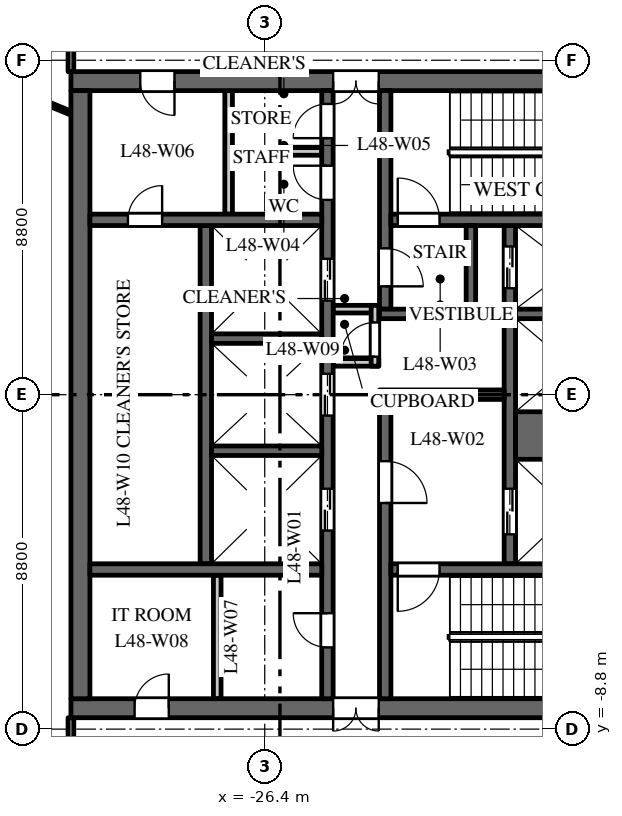
"""IFC4 building model, lengths in metres.
Left out: names, types, materials, properties, quantities, classifications, styles, units other than length and angle.
Written with IfcOpenShell. Run it as: python <this file> out.ifc"""

import sys

from ifc_helpers import new_model, si_unit, direction, frame, frame_2d, origin, place, context, subcontext, project, spatial, rectangle, extrude, element, fill, save


model = new_model("IFC4")
c1 = context("Model", 3, precision=1e-05, world=origin(), true_north=direction((0.0, 1.0)))
c2 = subcontext(c1, "Body", "Model", "MODEL_VIEW")
j1 = project(units=[si_unit("LENGTHUNIT", "METRE"), si_unit("PLANEANGLEUNIT", "RADIAN")], contexts=[c1])
p1 = place(None, origin())
s1 = spatial("IfcSite", under=j1, at=p1, CompositionType="ELEMENT")
p2 = place(p1, origin())
s2 = spatial("IfcBuilding", under=s1, at=p2, CompositionType="ELEMENT")
p3 = place(p2, frame((0.0, 0.0, 233.5)))
s3 = spatial("IfcBuildingStorey", under=s2, at=p3, CompositionType="ELEMENT", Elevation=233.5)
p4 = place(p3, frame((-16.5, 8.25, 0.0), z_axis=(0.0, 0.0, 1.0), x_axis=(-1.0, 0.0, 0.0)))
e1 = element("IfcWall", 1, at=p4, inside=s3, PredefinedType="SHEAR", context=c2, shape_type="SweptSolid", body=[
    extrude(rectangle(XDim=15.0, YDim=0.5, at=frame_2d((7.5, 0.0))), origin(), (0.0, 0.0, 1.0), 3.7),
])
p5 = place(p4, frame((6.9, 0.0, 0.0)))
e2 = element("IfcOpeningElement", 2, at=p5, cuts=e1, PredefinedType="OPENING", context=c2, shape_type="SweptSolid", body=[
    extrude(rectangle(XDim=1.2, YDim=2.1, at=frame_2d((0.6, 1.05))), frame((0.0, 0.26, 0.0), z_axis=(0.0, -1.0, 0.0), x_axis=(1.0, 0.0, 0.0)), (0.0, 0.0, 1.0), 0.52),
])
p6 = place(p4, frame((12.275, 0.0, 0.0)))
e3 = element("IfcOpeningElement", 3, at=p6, cuts=e1, PredefinedType="OPENING", context=c2, shape_type="SweptSolid", body=[
    extrude(rectangle(XDim=0.9, YDim=2.1, at=frame_2d((0.45, 1.05))), frame((0.0, 0.26, 0.0), z_axis=(0.0, -1.0, 0.0), x_axis=(1.0, 0.0, 0.0)), (0.0, 0.0, 1.0), 0.52),
])
p7 = place(p3, frame((-16.5, -8.25, 0.0), z_axis=(0.0, 0.0, 1.0), x_axis=(-1.0, 0.0, 0.0)))
e4 = element("IfcWall", 4, at=p7, inside=s3, PredefinedType="SHEAR", context=c2, shape_type="SweptSolid", body=[
    extrude(rectangle(XDim=15.0, YDim=0.5, at=frame_2d((7.5, 0.0))), origin(), (0.0, 0.0, 1.0), 3.7),
])
p8 = place(p7, frame((6.9, 0.0, 0.0)))
e5 = element("IfcOpeningElement", 5, at=p8, cuts=e4, PredefinedType="OPENING", context=c2, shape_type="SweptSolid", body=[
    extrude(rectangle(XDim=1.2, YDim=2.1, at=frame_2d((0.6, 1.05))), frame((0.0, 0.26, 0.0), z_axis=(0.0, -1.0, 0.0), x_axis=(1.0, 0.0, 0.0)), (0.0, 0.0, 1.0), 0.52),
])
p9 = place(p7, frame((12.425, 0.0, 0.0)))
e6 = element("IfcOpeningElement", 6, at=p9, cuts=e4, PredefinedType="OPENING", context=c2, shape_type="SweptSolid", body=[
    extrude(rectangle(XDim=0.9, YDim=2.1, at=frame_2d((0.45, 1.05))), frame((0.0, 0.26, 0.0), z_axis=(0.0, -1.0, 0.0), x_axis=(1.0, 0.0, 0.0)), (0.0, 0.0, 1.0), 0.52),
])
p10 = place(p3, frame((-27.95, -4.45, 0.0), z_axis=(0.0, 0.0, 1.0), x_axis=(0.0, 1.0, 0.0)))
e7 = element("IfcWall", 7, at=p10, inside=s3, PredefinedType="SHEAR", context=c2, shape_type="SweptSolid", body=[
    extrude(rectangle(XDim=8.9, YDim=0.3, at=frame_2d((4.45, 0.0))), origin(), (0.0, 0.0, 1.0), 3.7),
])
p11 = place(p3, frame((-19.95, -4.45, 0.0), z_axis=(0.0, 0.0, 1.0), x_axis=(0.0, 1.0, 0.0)))
e8 = element("IfcWall", 8, at=p11, inside=s3, PredefinedType="SHEAR", context=c2, shape_type="SweptSolid", body=[
    extrude(rectangle(XDim=8.9, YDim=0.3, at=frame_2d((4.45, 0.0))), origin(), (0.0, 0.0, 1.0), 3.7),
])
p12 = place(p11, frame((0.775, 0.0, 0.0)))
e9 = element("IfcOpeningElement", 9, at=p12, cuts=e8, PredefinedType="OPENING", context=c2, shape_type="SweptSolid", body=[
    extrude(rectangle(XDim=1.2, YDim=2.1, at=frame_2d((0.6, 1.05))), frame((0.0, 0.16, 0.0), z_axis=(0.0, -1.0, 0.0), x_axis=(1.0, 0.0, 0.0)), (0.0, 0.0, 1.0), 0.32),
])
p13 = place(p11, frame((7.25, 0.0, 0.0)))
e10 = element("IfcOpeningElement", 10, at=p13, cuts=e8, PredefinedType="OPENING", context=c2, shape_type="SweptSolid", body=[
    extrude(rectangle(XDim=1.1, YDim=2.1, at=frame_2d((0.55, 1.05))), frame((0.0, 0.16, 0.0), z_axis=(0.0, -1.0, 0.0), x_axis=(1.0, 0.0, 0.0)), (0.0, 0.0, 1.0), 0.32),
])
p14 = place(p3, frame((-24.75, -8.0, 0.0), z_axis=(0.0, 0.0, 1.0), x_axis=(0.0, 1.0, 0.0)))
e11 = element("IfcWall", 11, at=p14, inside=s3, PredefinedType="SHEAR", context=c2, shape_type="SweptSolid", body=[
    extrude(rectangle(XDim=16.0, YDim=0.3, at=frame_2d((8.0, 0.0))), origin(), (0.0, 0.0, 1.0), 3.7),
])
p15 = place(p14, frame((4.425, 0.0, 0.0)))
e12 = element("IfcOpeningElement", 12, at=p15, cuts=e11, PredefinedType="OPENING", context=c2, shape_type="SweptSolid", body=[
    extrude(rectangle(XDim=1.1, YDim=2.1, at=frame_2d((0.55, 1.05))), frame((0.0, 0.16, 0.0), z_axis=(0.0, -1.0, 0.0), x_axis=(1.0, 0.0, 0.0)), (0.0, 0.0, 1.0), 0.32),
])
p16 = place(p14, frame((7.45, 0.0, 0.0)))
e13 = element("IfcOpeningElement", 13, at=p16, cuts=e11, PredefinedType="OPENING", context=c2, shape_type="SweptSolid", body=[
    extrude(rectangle(XDim=1.1, YDim=2.1, at=frame_2d((0.55, 1.05))), frame((0.0, 0.16, 0.0), z_axis=(0.0, -1.0, 0.0), x_axis=(1.0, 0.0, 0.0)), (0.0, 0.0, 1.0), 0.32),
])
p17 = place(p14, frame((10.475, 0.0, 0.0)))
e14 = element("IfcOpeningElement", 14, at=p17, cuts=e11, PredefinedType="OPENING", context=c2, shape_type="SweptSolid", body=[
    extrude(rectangle(XDim=1.1, YDim=2.1, at=frame_2d((0.55, 1.05))), frame((0.0, 0.16, 0.0), z_axis=(0.0, -1.0, 0.0), x_axis=(1.0, 0.0, 0.0)), (0.0, 0.0, 1.0), 0.32),
])
p18 = place(p14, frame((13.125, 0.0, 0.0)))
e15 = element("IfcOpeningElement", 15, at=p18, cuts=e11, PredefinedType="OPENING", context=c2, shape_type="SweptSolid", body=[
    extrude(rectangle(XDim=0.9, YDim=2.1, at=frame_2d((0.45, 1.05))), frame((0.0, 0.16, 0.0), z_axis=(0.0, -1.0, 0.0), x_axis=(1.0, 0.0, 0.0)), (0.0, 0.0, 1.0), 0.32),
])
p19 = place(p14, frame((14.75, 0.0, 0.0)))
e16 = element("IfcOpeningElement", 16, at=p19, cuts=e11, PredefinedType="OPENING", context=c2, shape_type="SweptSolid", body=[
    extrude(rectangle(XDim=0.9, YDim=2.1, at=frame_2d((0.45, 1.05))), frame((0.0, 0.16, 0.0), z_axis=(0.0, -1.0, 0.0), x_axis=(1.0, 0.0, 0.0)), (0.0, 0.0, 1.0), 0.32),
])
p20 = place(p14, frame((1.35, 0.0, 0.0)))
e17 = element("IfcOpeningElement", 17, at=p20, cuts=e11, PredefinedType="OPENING", context=c2, shape_type="SweptSolid", body=[
    extrude(rectangle(XDim=0.9, YDim=2.1, at=frame_2d((0.45, 1.05))), frame((0.0, 0.16, 0.0), z_axis=(0.0, -1.0, 0.0), x_axis=(1.0, 0.0, 0.0)), (0.0, 0.0, 1.0), 0.32),
])
p21 = place(p3, frame((-20.1, 0.0, 0.0), z_axis=(0.0, 0.0, 1.0), x_axis=(-1.0, 0.0, 0.0)))
e18 = element("IfcWall", 18, at=p21, inside=s3, PredefinedType="SHEAR", context=c2, shape_type="SweptSolid", body=[
    extrude(rectangle(XDim=3.28, YDim=0.25, at=frame_2d((1.64, 0.0))), origin(), (0.0, 0.0, 1.0), 3.7),
])
for number, where, z_axis, x_axis in (
    (19, (-23.4, 0.85, 0.0), (0.0, 0.0, 1.0), (-1.0, 0.0, 0.0)),
    (20, (-23.4, 2.25, 0.0), (0.0, 0.0, 1.0), (-1.0, 0.0, 0.0)),
):
    element("IfcWall", number, at=place(p3, frame(where, z_axis=z_axis, x_axis=x_axis)), inside=s3, PredefinedType="PARTITIONING", context=c2, shape_type="SweptSolid", body=[
        extrude(rectangle(XDim=1.2, YDim=0.2, at=frame_2d((0.6, 0.0))), origin(), (0.0, 0.0, 1.0), 3.7),
    ])
p22 = place(p3, frame((-23.5, 0.75, 0.0), z_axis=(0.0, 0.0, 1.0), x_axis=(0.0, 1.0, 0.0)))
e21 = element("IfcWall", 21, at=p22, inside=s3, PredefinedType="PARTITIONING", context=c2, shape_type="SweptSolid", body=[
    extrude(rectangle(XDim=1.6, YDim=0.2, at=frame_2d((0.8, 0.0))), origin(), (0.0, 0.0, 1.0), 3.7),
])
p23 = place(p22, frame((0.25, 0.0, 0.0)))
e22 = element("IfcOpeningElement", 22, at=p23, cuts=e21, PredefinedType="OPENING", context=c2, shape_type="SweptSolid", body=[
    extrude(rectangle(XDim=0.9, YDim=2.1, at=frame_2d((0.45, 1.05))), frame((0.0, 0.11, 0.0), z_axis=(0.0, -1.0, 0.0), x_axis=(1.0, 0.0, 0.0)), (0.0, 0.0, 1.0), 0.22),
])
p24 = place(p3, frame((-31.25, -8.0, 0.0), z_axis=(0.0, 0.0, 1.0), x_axis=(0.0, 1.0, 0.0)))
e23 = element("IfcWall", 23, at=p24, inside=s3, PredefinedType="SHEAR", context=c2, shape_type="SweptSolid", body=[
    extrude(rectangle(XDim=16.0, YDim=0.5, at=frame_2d((8.0, 0.0))), origin(), (0.0, 0.0, 1.0), 3.7),
])
p25 = place(p3, frame((-24.9, 4.6, 0.0), z_axis=(0.0, 0.0, 1.0), x_axis=(-1.0, 0.0, 0.0)))
e24 = element("IfcWall", 24, at=p25, inside=s3, PredefinedType="SHEAR", context=c2, shape_type="SweptSolid", body=[
    extrude(rectangle(XDim=6.1, YDim=0.3, at=frame_2d((3.05, 0.0))), origin(), (0.0, 0.0, 1.0), 3.7),
])
p26 = place(p25, frame((4.2, 0.0, 0.0)))
e25 = element("IfcOpeningElement", 25, at=p26, cuts=e24, PredefinedType="OPENING", context=c2, shape_type="SweptSolid", body=[
    extrude(rectangle(XDim=0.9, YDim=2.1, at=frame_2d((0.45, 1.05))), frame((0.0, 0.16, 0.0), z_axis=(0.0, -1.0, 0.0), x_axis=(1.0, 0.0, 0.0)), (0.0, 0.0, 1.0), 0.32),
])
for number, where, z_axis, x_axis in (
    (26, (-27.35, 4.75, 0.0), (0.0, 0.0, 1.0), (0.0, 1.0, 0.0)),
    (27, (-27.65, -8.0, 0.0), (0.0, 0.0, 1.0), (0.0, 1.0, 0.0)),
):
    element("IfcWall", number, at=place(p3, frame(where, z_axis=z_axis, x_axis=x_axis)), inside=s3, PredefinedType="PARTITIONING", context=c2, shape_type="SweptSolid", body=[
        extrude(rectangle(XDim=3.25, YDim=0.2, at=frame_2d((1.625, 0.0))), origin(), (0.0, 0.0, 1.0), 3.7),
    ])
p27 = place(p3, frame((-24.9, 6.4, 0.0), z_axis=(0.0, 0.0, 1.0), x_axis=(-1.0, 0.0, 0.0)))
e28 = element("IfcWall", 28, at=p27, inside=s3, PredefinedType="PARTITIONING", context=c2, shape_type="SweptSolid", body=[
    extrude(rectangle(XDim=2.35, YDim=0.2, at=frame_2d((1.175, 0.0))), origin(), (0.0, 0.0, 1.0), 3.7),
])
p28 = place(p3, frame((-24.9, -4.6, 0.0), z_axis=(0.0, 0.0, 1.0), x_axis=(-1.0, 0.0, 0.0)))
e29 = element("IfcWall", 29, at=p28, inside=s3, PredefinedType="SHEAR", context=c2, shape_type="SweptSolid", body=[
    extrude(rectangle(XDim=6.1, YDim=0.3, at=frame_2d((3.05, 0.0))), origin(), (0.0, 0.0, 1.0), 3.7),
])
p29 = place(p3, frame((-16.9, -1.075, 0.0), z_axis=(0.0, 0.0, 1.0), x_axis=(-1.0, 0.0, 0.0)))
e30 = element("IfcWall", 30, at=p29, inside=s3, PredefinedType="SHEAR", context=c2, shape_type="SweptSolid", body=[
    extrude(rectangle(XDim=2.9, YDim=1.25, at=frame_2d((1.45, 0.0))), origin(), (0.0, 0.0, 1.0), 3.7),
])
for number, where, z_axis, x_axis in (
    (31, (-16.9, 2.125, 0.0), (0.0, 0.0, 1.0), (-1.0, 0.0, 0.0)),
    (32, (-24.9, -1.475, 0.0), (0.0, 0.0, 1.0), (-1.0, 0.0, 0.0)),
    (33, (-24.9, 1.475, 0.0), (0.0, 0.0, 1.0), (-1.0, 0.0, 0.0)),
):
    element("IfcWall", number, at=place(p3, frame(where, z_axis=z_axis, x_axis=x_axis)), inside=s3, PredefinedType="SHEAR", context=c2, shape_type="SweptSolid", body=[
        extrude(rectangle(XDim=2.9, YDim=0.25, at=frame_2d((1.45, 0.0))), origin(), (0.0, 0.0, 1.0), 3.7),
    ])
p30 = place(p3, frame((-23.23, 2.25, 0.0), z_axis=(0.0, 0.0, 1.0), x_axis=(0.0, 1.0, 0.0)))
e34 = element("IfcWall", 34, at=p30, inside=s3, PredefinedType="SHEAR", context=c2, shape_type="SweptSolid", body=[
    extrude(rectangle(XDim=5.75, YDim=0.3, at=frame_2d((2.875, 0.0))), origin(), (0.0, 0.0, 1.0), 3.7),
])
p31 = place(p30, frame((0.6, 0.0, 0.0)))
e35 = element("IfcOpeningElement", 35, at=p31, cuts=e34, PredefinedType="OPENING", context=c2, shape_type="SweptSolid", body=[
    extrude(rectangle(XDim=1.0, YDim=2.1, at=frame_2d((0.5, 1.05))), frame((0.0, 0.16, 0.0), z_axis=(0.0, -1.0, 0.0), x_axis=(1.0, 0.0, 0.0)), (0.0, 0.0, 1.0), 0.32),
])
p32 = place(p3, frame((-23.23, -8.0, 0.0), z_axis=(0.0, 0.0, 1.0), x_axis=(0.0, 1.0, 0.0)))
e36 = element("IfcWall", 36, at=p32, inside=s3, PredefinedType="SHEAR", context=c2, shape_type="SweptSolid", body=[
    extrude(rectangle(XDim=7.875, YDim=0.3, at=frame_2d((3.938, 0.0))), origin(), (0.0, 0.0, 1.0), 3.7),
])
p33 = place(p32, frame((5.15, 0.0, 0.0)))
e37 = element("IfcOpeningElement", 37, at=p33, cuts=e36, PredefinedType="OPENING", context=c2, shape_type="SweptSolid", body=[
    extrude(rectangle(XDim=1.1, YDim=2.1, at=frame_2d((0.55, 1.05))), frame((0.0, 0.16, 0.0), z_axis=(0.0, -1.0, 0.0), x_axis=(1.0, 0.0, 0.0)), (0.0, 0.0, 1.0), 0.32),
])
p34 = place(p3, frame((-16.9, 4.6, 0.0), z_axis=(0.0, 0.0, 1.0), x_axis=(-1.0, 0.0, 0.0)))
e38 = element("IfcWall", 38, at=p34, inside=s3, PredefinedType="SHEAR", context=c2, shape_type="SweptSolid", body=[
    extrude(rectangle(XDim=6.18, YDim=0.3, at=frame_2d((3.09, 0.0))), origin(), (0.0, 0.0, 1.0), 3.7),
])
p35 = place(p34, frame((4.9, 0.0, 0.0)))
e39 = element("IfcOpeningElement", 39, at=p35, cuts=e38, PredefinedType="OPENING", context=c2, shape_type="SweptSolid", body=[
    extrude(rectangle(XDim=1.1, YDim=2.1, at=frame_2d((0.55, 1.05))), frame((0.0, 0.16, 0.0), z_axis=(0.0, -1.0, 0.0), x_axis=(1.0, 0.0, 0.0)), (0.0, 0.0, 1.0), 0.32),
])
p36 = place(p3, frame((-16.9, -4.6, 0.0), z_axis=(0.0, 0.0, 1.0), x_axis=(-1.0, 0.0, 0.0)))
e40 = element("IfcWall", 40, at=p36, inside=s3, PredefinedType="SHEAR", context=c2, shape_type="SweptSolid", body=[
    extrude(rectangle(XDim=6.18, YDim=0.3, at=frame_2d((3.09, 0.0))), origin(), (0.0, 0.0, 1.0), 3.7),
])
p37 = place(p36, frame((4.9, 0.0, 0.0)))
e41 = element("IfcOpeningElement", 41, at=p37, cuts=e40, PredefinedType="OPENING", context=c2, shape_type="SweptSolid", body=[
    extrude(rectangle(XDim=1.1, YDim=2.1, at=frame_2d((0.55, 1.05))), frame((0.0, 0.16, 0.0), z_axis=(0.0, -1.0, 0.0), x_axis=(1.0, 0.0, 0.0)), (0.0, 0.0, 1.0), 0.32),
])
p38 = place(p3, frame((-20.85, 2.125, 0.0), z_axis=(0.0, 0.0, 1.0), x_axis=(-1.0, 0.0, 0.0)))
e42 = element("IfcWall", 42, at=p38, inside=s3, PredefinedType="SHEAR", context=c2, shape_type="SweptSolid", body=[
    extrude(rectangle(XDim=2.53, YDim=0.25, at=frame_2d((1.265, 0.0))), origin(), (0.0, 0.0, 1.0), 3.7),
])
p39 = place(p3, frame((-20.975, 2.25, 0.0), z_axis=(0.0, 0.0, 1.0), x_axis=(0.0, 1.0, 0.0)))
e43 = element("IfcWall", 43, at=p39, inside=s3, PredefinedType="SHEAR", context=c2, shape_type="SweptSolid", body=[
    extrude(rectangle(XDim=2.2, YDim=0.25, at=frame_2d((1.1, 0.0))), origin(), (0.0, 0.0, 1.0), 3.7),
])
p40 = place(p3, frame((-34.234, 8.53, 0.0), z_axis=(0.0, 0.0, 1.0), x_axis=(0.925344112436, -0.379128307542, 0.0)))
e44 = element("IfcWall", 44, at=p40, inside=s3, PredefinedType="PARTITIONING", context=c2, shape_type="SweptSolid", body=[
    extrude(rectangle(XDim=2.954, YDim=0.1, at=frame_2d((1.477, 0.0))), origin(), (0.0, 0.0, 1.0), 3.0),
])
for number, where, z_axis, x_axis in (
    (45, (-31.5, -10.7, 0.0), (0.0, 0.0, 1.0), (0.0, 1.0, 0.0)),
    (46, (-31.5, 8.5, 0.0), (0.0, 0.0, 1.0), (0.0, 1.0, 0.0)),
):
    element("IfcWall", number, at=place(p3, frame(where, z_axis=z_axis, x_axis=x_axis)), inside=s3, PredefinedType="PARTITIONING", context=c2, shape_type="SweptSolid", body=[
        extrude(rectangle(XDim=2.2, YDim=0.15, at=frame_2d((1.1, 0.0))), origin(), (0.0, 0.0, 1.0), 3.7),
    ])
p41 = place(p12, origin())
e47 = element("IfcDoor", 47, at=p41, inside=s3, OperationType="DOUBLE_DOOR_SLIDING", PredefinedType="DOOR", context=c2, shape_type="SweptSolid", body=[
    extrude(rectangle(XDim=1.2, YDim=2.1, at=frame_2d((0.6, 1.05))), frame((0.0, 0.025, 0.0), z_axis=(0.0, -1.0, 0.0), x_axis=(1.0, 0.0, 0.0)), (0.0, 0.0, 1.0), 0.05),
])
fill(e9, e47)
p42 = place(p13, origin())
e48 = element("IfcDoor", 48, at=p42, inside=s3, OperationType="DOUBLE_DOOR_SLIDING", PredefinedType="DOOR", context=c2, shape_type="SweptSolid", body=[
    extrude(rectangle(XDim=1.1, YDim=2.1, at=frame_2d((0.55, 1.05))), frame((0.0, 0.025, 0.0), z_axis=(0.0, -1.0, 0.0), x_axis=(1.0, 0.0, 0.0)), (0.0, 0.0, 1.0), 0.05),
])
fill(e10, e48)
p43 = place(p15, origin())
e49 = element("IfcDoor", 49, at=p43, inside=s3, OperationType="DOUBLE_DOOR_SLIDING", PredefinedType="DOOR", context=c2, shape_type="SweptSolid", body=[
    extrude(rectangle(XDim=1.1, YDim=2.1, at=frame_2d((0.55, 1.05))), frame((0.0, 0.025, 0.0), z_axis=(0.0, -1.0, 0.0), x_axis=(1.0, 0.0, 0.0)), (0.0, 0.0, 1.0), 0.05),
])
fill(e12, e49)
p44 = place(p16, origin())
e50 = element("IfcDoor", 50, at=p44, inside=s3, OperationType="DOUBLE_DOOR_SLIDING", PredefinedType="DOOR", context=c2, shape_type="SweptSolid", body=[
    extrude(rectangle(XDim=1.1, YDim=2.1, at=frame_2d((0.55, 1.05))), frame((0.0, 0.025, 0.0), z_axis=(0.0, -1.0, 0.0), x_axis=(1.0, 0.0, 0.0)), (0.0, 0.0, 1.0), 0.05),
])
fill(e13, e50)
p45 = place(p17, origin())
e51 = element("IfcDoor", 51, at=p45, inside=s3, OperationType="DOUBLE_DOOR_SLIDING", PredefinedType="DOOR", context=c2, shape_type="SweptSolid", body=[
    extrude(rectangle(XDim=1.1, YDim=2.1, at=frame_2d((0.55, 1.05))), frame((0.0, 0.025, 0.0), z_axis=(0.0, -1.0, 0.0), x_axis=(1.0, 0.0, 0.0)), (0.0, 0.0, 1.0), 0.05),
])
fill(e14, e51)
p46 = place(p35, origin())
e52 = element("IfcDoor", 52, at=p46, inside=s3, OperationType="SINGLE_SWING_RIGHT", PredefinedType="DOOR", context=c2, shape_type="SweptSolid", body=[
    extrude(rectangle(XDim=1.1, YDim=2.1, at=frame_2d((0.55, 1.05))), frame((0.0, 0.025, 0.0), z_axis=(0.0, -1.0, 0.0), x_axis=(1.0, 0.0, 0.0)), (0.0, 0.0, 1.0), 0.05),
])
fill(e39, e52)
p47 = place(p37, origin())
e53 = element("IfcDoor", 53, at=p47, inside=s3, OperationType="SINGLE_SWING_LEFT", PredefinedType="DOOR", context=c2, shape_type="SweptSolid", body=[
    extrude(rectangle(XDim=1.1, YDim=2.1, at=frame_2d((0.55, 1.05))), frame((0.0, 0.025, 0.0), z_axis=(0.0, -1.0, 0.0), x_axis=(1.0, 0.0, 0.0)), (0.0, 0.0, 1.0), 0.05),
])
fill(e41, e53)
p48 = place(p33, origin())
e54 = element("IfcDoor", 54, at=p48, inside=s3, OperationType="SINGLE_SWING_LEFT", PredefinedType="DOOR", context=c2, shape_type="SweptSolid", body=[
    extrude(rectangle(XDim=1.1, YDim=2.1, at=frame_2d((0.55, 1.05))), frame((0.0, 0.025, 0.0), z_axis=(0.0, -1.0, 0.0), x_axis=(1.0, 0.0, 0.0)), (0.0, 0.0, 1.0), 0.05),
])
fill(e37, e54)
p49 = place(p31, origin())
e55 = element("IfcDoor", 55, at=p49, inside=s3, OperationType="SINGLE_SWING_LEFT", PredefinedType="DOOR", context=c2, shape_type="SweptSolid", body=[
    extrude(rectangle(XDim=1.0, YDim=2.1, at=frame_2d((0.5, 1.05))), frame((0.0, 0.025, 0.0), z_axis=(0.0, -1.0, 0.0), x_axis=(1.0, 0.0, 0.0)), (0.0, 0.0, 1.0), 0.05),
])
fill(e35, e55)
p50 = place(p5, origin())
e56 = element("IfcDoor", 56, at=p50, inside=s3, OperationType="DOUBLE_DOOR_DOUBLE_SWING", PredefinedType="DOOR", context=c2, shape_type="SweptSolid", body=[
    extrude(rectangle(XDim=1.2, YDim=2.1, at=frame_2d((0.6, 1.05))), frame((0.0, 0.025, 0.0), z_axis=(0.0, -1.0, 0.0), x_axis=(1.0, 0.0, 0.0)), (0.0, 0.0, 1.0), 0.05),
])
fill(e2, e56)
p51 = place(p8, origin())
e57 = element("IfcDoor", 57, at=p51, inside=s3, OperationType="DOUBLE_DOOR_DOUBLE_SWING", PredefinedType="DOOR", context=c2, shape_type="SweptSolid", body=[
    extrude(rectangle(XDim=1.2, YDim=2.1, at=frame_2d((0.6, 1.05))), frame((0.0, 0.025, 0.0), z_axis=(0.0, -1.0, 0.0), x_axis=(1.0, 0.0, 0.0)), (0.0, 0.0, 1.0), 0.05),
])
fill(e5, e57)
p52 = place(p18, origin())
e58 = element("IfcDoor", 58, at=p52, inside=s3, OperationType="SINGLE_SWING_LEFT", PredefinedType="DOOR", context=c2, shape_type="SweptSolid", body=[
    extrude(rectangle(XDim=0.9, YDim=2.1, at=frame_2d((0.45, 1.05))), frame((0.0, 0.025, 0.0), z_axis=(0.0, -1.0, 0.0), x_axis=(1.0, 0.0, 0.0)), (0.0, 0.0, 1.0), 0.05),
])
fill(e15, e58)
p53 = place(p19, origin())
e59 = element("IfcDoor", 59, at=p53, inside=s3, OperationType="SINGLE_SWING_RIGHT", PredefinedType="DOOR", context=c2, shape_type="SweptSolid", body=[
    extrude(rectangle(XDim=0.9, YDim=2.1, at=frame_2d((0.45, 1.05))), frame((0.0, 0.025, 0.0), z_axis=(0.0, -1.0, 0.0), x_axis=(1.0, 0.0, 0.0)), (0.0, 0.0, 1.0), 0.05),
])
fill(e16, e59)
p54 = place(p6, origin())
e60 = element("IfcDoor", 60, at=p54, inside=s3, OperationType="SINGLE_SWING_RIGHT", PredefinedType="DOOR", context=c2, shape_type="SweptSolid", body=[
    extrude(rectangle(XDim=0.9, YDim=2.1, at=frame_2d((0.45, 1.05))), frame((0.0, 0.025, 0.0), z_axis=(0.0, -1.0, 0.0), x_axis=(1.0, 0.0, 0.0)), (0.0, 0.0, 1.0), 0.05),
])
fill(e3, e60)
p55 = place(p20, origin())
e61 = element("IfcDoor", 61, at=p55, inside=s3, OperationType="SINGLE_SWING_LEFT", PredefinedType="DOOR", context=c2, shape_type="SweptSolid", body=[
    extrude(rectangle(XDim=0.9, YDim=2.1, at=frame_2d((0.45, 1.05))), frame((0.0, 0.025, 0.0), z_axis=(0.0, -1.0, 0.0), x_axis=(1.0, 0.0, 0.0)), (0.0, 0.0, 1.0), 0.05),
])
fill(e17, e61)
p56 = place(p9, origin())
e62 = element("IfcDoor", 62, at=p56, inside=s3, OperationType="SINGLE_SWING_LEFT", PredefinedType="DOOR", context=c2, shape_type="SweptSolid", body=[
    extrude(rectangle(XDim=0.9, YDim=2.1, at=frame_2d((0.45, 1.05))), frame((0.0, 0.025, 0.0), z_axis=(0.0, -1.0, 0.0), x_axis=(1.0, 0.0, 0.0)), (0.0, 0.0, 1.0), 0.05),
])
fill(e6, e62)
p57 = place(p23, origin())
e63 = element("IfcDoor", 63, at=p57, inside=s3, OperationType="SINGLE_SWING_RIGHT", PredefinedType="DOOR", context=c2, shape_type="SweptSolid", body=[
    extrude(rectangle(XDim=0.9, YDim=2.1, at=frame_2d((0.45, 1.05))), frame((0.0, 0.025, 0.0), z_axis=(0.0, -1.0, 0.0), x_axis=(1.0, 0.0, 0.0)), (0.0, 0.0, 1.0), 0.05),
])
fill(e22, e63)
p58 = place(p26, origin())
e64 = element("IfcDoor", 64, at=p58, inside=s3, OperationType="SINGLE_SWING_LEFT", PredefinedType="DOOR", context=c2, shape_type="SweptSolid", body=[
    extrude(rectangle(XDim=0.9, YDim=2.1, at=frame_2d((0.45, 1.05))), frame((0.0, 0.025, 0.0), z_axis=(0.0, -1.0, 0.0), x_axis=(1.0, 0.0, 0.0)), (0.0, 0.0, 1.0), 0.05),
])
fill(e25, e64)
save(model, sys.argv[1])
